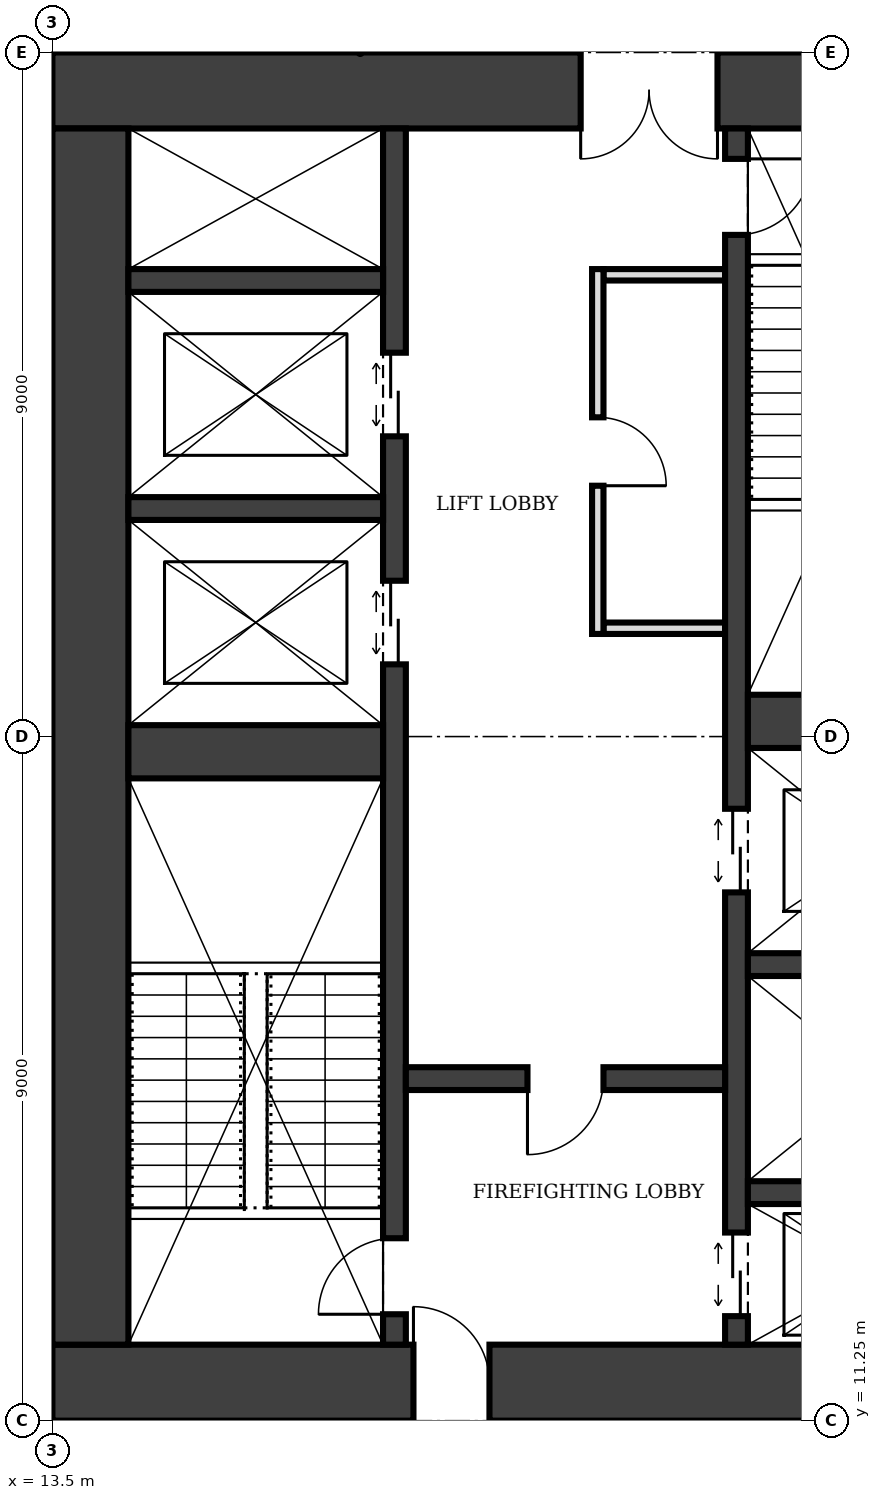
"""IFC4 building model, lengths in metres.
Left out: names, types, materials, properties, quantities, classifications, styles, units other than length and angle.
Written with IfcOpenShell. Run it as: python <this file> out.ifc"""

import sys

from ifc_helpers import new_model, si_unit, direction, frame, frame_2d, origin, place, context, subcontext, project, spatial, rectangle, extrude, element, fill, save


model = new_model("IFC4")
c1 = context("Model", 3, precision=1e-05, world=origin(), true_north=direction((0.0, 1.0)))
c2 = subcontext(c1, "Body", "Model", "MODEL_VIEW")
j1 = project(units=[si_unit("LENGTHUNIT", "METRE"), si_unit("PLANEANGLEUNIT", "RADIAN")], contexts=[c1])
p1 = place(None, origin())
s1 = spatial("IfcSite", under=j1, at=p1, CompositionType="ELEMENT")
p2 = place(p1, origin())
s2 = spatial("IfcBuilding", under=s1, at=p2, CompositionType="ELEMENT")
p3 = place(p2, frame((0.0, 0.0, 57.0)))
s3 = spatial("IfcBuildingStorey", under=s2, at=p3, CompositionType="ELEMENT", Elevation=57.0)
p4 = place(p3, frame((13.5, 11.75, 0.0), z_axis=(0.0, 0.0, 1.0), x_axis=(1.0, 0.0, 0.0)))
e1 = element("IfcWall", 1, at=p4, inside=s3, PredefinedType="SHEAR", context=c2, shape_type="SweptSolid", body=[
    extrude(rectangle(XDim=13.5, YDim=1.0, at=frame_2d((6.75, 0.0))), origin(), (0.0, 0.0, 1.0), 4.0),
])
p5 = place(p4, frame((4.75, 0.0, 0.0)))
e2 = element("IfcOpeningElement", 2, at=p5, cuts=e1, PredefinedType="OPENING", context=c2, shape_type="SweptSolid", body=[
    extrude(rectangle(XDim=1.0, YDim=2.1, at=frame_2d((0.5, 1.05))), frame((0.0, 0.51, 0.0), z_axis=(0.0, -1.0, 0.0), x_axis=(1.0, 0.0, 0.0)), (0.0, 0.0, 1.0), 1.02),
])
p6 = place(p3, frame((27.0, 28.75, 0.0), z_axis=(0.0, 0.0, 1.0), x_axis=(-1.0, 0.0, 0.0)))
e3 = element("IfcWall", 3, at=p6, inside=s3, PredefinedType="SHEAR", context=c2, shape_type="SweptSolid", body=[
    extrude(rectangle(XDim=13.5, YDim=1.0, at=frame_2d((6.75, 0.0))), origin(), (0.0, 0.0, 1.0), 4.0),
])
p7 = place(p6, frame((4.75, 0.0, 0.0)))
e4 = element("IfcOpeningElement", 4, at=p7, cuts=e3, PredefinedType="OPENING", context=c2, shape_type="SweptSolid", body=[
    extrude(rectangle(XDim=1.8, YDim=2.1, at=frame_2d((0.9, 1.05))), frame((0.0, 0.51, 0.0), z_axis=(0.0, -1.0, 0.0), x_axis=(1.0, 0.0, 0.0)), (0.0, 0.0, 1.0), 1.02),
])
p8 = place(p3, frame((14.0, 28.25, 0.0), z_axis=(0.0, 0.0, 1.0), x_axis=(0.0, -1.0, 0.0)))
e5 = element("IfcWall", 5, at=p8, inside=s3, PredefinedType="SHEAR", context=c2, shape_type="SweptSolid", body=[
    extrude(rectangle(XDim=16.0, YDim=1.0, at=frame_2d((8.0, 0.0))), origin(), (0.0, 0.0, 1.0), 4.0),
])
p9 = place(p3, frame((18.0, 12.25, 0.0), z_axis=(0.0, 0.0, 1.0), x_axis=(0.0, 1.0, 0.0)))
e6 = element("IfcWall", 6, at=p9, inside=s3, PredefinedType="SHEAR", context=c2, shape_type="SweptSolid", body=[
    extrude(rectangle(XDim=16.0, YDim=0.3, at=frame_2d((8.0, 0.0))), origin(), (0.0, 0.0, 1.0), 4.0),
])
p10 = place(p9, frame((0.4, 0.0, 0.0)))
e7 = element("IfcOpeningElement", 7, at=p10, cuts=e6, PredefinedType="OPENING", context=c2, shape_type="SweptSolid", body=[
    extrude(rectangle(XDim=1.0, YDim=2.1, at=frame_2d((0.5, 1.05))), frame((0.0, 0.16, 0.0), z_axis=(0.0, -1.0, 0.0), x_axis=(1.0, 0.0, 0.0)), (0.0, 0.0, 1.0), 0.32),
])
p11 = place(p9, frame((8.95, 0.0, 0.0)))
e8 = element("IfcOpeningElement", 8, at=p11, cuts=e6, PredefinedType="OPENING", context=c2, shape_type="SweptSolid", body=[
    extrude(rectangle(XDim=1.1, YDim=2.1, at=frame_2d((0.55, 1.05))), frame((0.0, 0.16, 0.0), z_axis=(0.0, -1.0, 0.0), x_axis=(1.0, 0.0, 0.0)), (0.0, 0.0, 1.0), 0.32),
])
p12 = place(p9, frame((11.95, 0.0, 0.0)))
e9 = element("IfcOpeningElement", 9, at=p12, cuts=e6, PredefinedType="OPENING", context=c2, shape_type="SweptSolid", body=[
    extrude(rectangle(XDim=1.1, YDim=2.1, at=frame_2d((0.55, 1.05))), frame((0.0, 0.16, 0.0), z_axis=(0.0, -1.0, 0.0), x_axis=(1.0, 0.0, 0.0)), (0.0, 0.0, 1.0), 0.32),
])
p13 = place(p3, frame((22.5, 12.25, 0.0), z_axis=(0.0, 0.0, 1.0), x_axis=(0.0, 1.0, 0.0)))
e10 = element("IfcWall", 10, at=p13, inside=s3, PredefinedType="SHEAR", context=c2, shape_type="SweptSolid", body=[
    extrude(rectangle(XDim=16.0, YDim=0.3, at=frame_2d((8.0, 0.0))), origin(), (0.0, 0.0, 1.0), 4.0),
])
p14 = place(p13, frame((14.6, 0.0, 0.0)))
e11 = element("IfcOpeningElement", 11, at=p14, cuts=e10, PredefinedType="OPENING", context=c2, shape_type="SweptSolid", body=[
    extrude(rectangle(XDim=1.0, YDim=2.1, at=frame_2d((0.5, 1.05))), frame((0.0, 0.16, 0.0), z_axis=(0.0, -1.0, 0.0), x_axis=(1.0, 0.0, 0.0)), (0.0, 0.0, 1.0), 0.32),
])
p15 = place(p13, frame((0.375, 0.0, 0.0)))
e12 = element("IfcOpeningElement", 12, at=p15, cuts=e10, PredefinedType="OPENING", context=c2, shape_type="SweptSolid", body=[
    extrude(rectangle(XDim=1.1, YDim=2.1, at=frame_2d((0.55, 1.05))), frame((0.0, 0.16, 0.0), z_axis=(0.0, -1.0, 0.0), x_axis=(1.0, 0.0, 0.0)), (0.0, 0.0, 1.0), 0.32),
])
p16 = place(p13, frame((5.95, 0.0, 0.0)))
e13 = element("IfcOpeningElement", 13, at=p16, cuts=e10, PredefinedType="OPENING", context=c2, shape_type="SweptSolid", body=[
    extrude(rectangle(XDim=1.1, YDim=2.1, at=frame_2d((0.55, 1.05))), frame((0.0, 0.16, 0.0), z_axis=(0.0, -1.0, 0.0), x_axis=(1.0, 0.0, 0.0)), (0.0, 0.0, 1.0), 0.32),
])
p17 = place(p3, frame((14.5, 20.05, 0.0), z_axis=(0.0, 0.0, 1.0), x_axis=(1.0, 0.0, 0.0)))
e14 = element("IfcWall", 14, at=p17, inside=s3, PredefinedType="SHEAR", context=c2, shape_type="SweptSolid", body=[
    extrude(rectangle(XDim=3.35, YDim=0.7, at=frame_2d((1.675, 0.0))), origin(), (0.0, 0.0, 1.0), 4.0),
])
p18 = place(p3, frame((18.15, 15.75, 0.0), z_axis=(0.0, 0.0, 1.0), x_axis=(1.0, 0.0, 0.0)))
e15 = element("IfcWall", 15, at=p18, inside=s3, PredefinedType="SHEAR", context=c2, shape_type="SweptSolid", body=[
    extrude(rectangle(XDim=4.2, YDim=0.3, at=frame_2d((2.1, 0.0))), origin(), (0.0, 0.0, 1.0), 4.0),
])
p19 = place(p18, frame((1.6, 0.0, 0.0)))
e16 = element("IfcOpeningElement", 16, at=p19, cuts=e15, PredefinedType="OPENING", context=c2, shape_type="SweptSolid", body=[
    extrude(rectangle(XDim=1.0, YDim=2.1, at=frame_2d((0.5, 1.05))), frame((0.0, 0.16, 0.0), z_axis=(0.0, -1.0, 0.0), x_axis=(1.0, 0.0, 0.0)), (0.0, 0.0, 1.0), 0.32),
])
for number, where, z_axis, x_axis in (
    (17, (22.65, 14.25, 0.0), (0.0, 0.0, 1.0), (1.0, 0.0, 0.0)),
    (18, (22.65, 17.25, 0.0), (0.0, 0.0, 1.0), (1.0, 0.0, 0.0)),
):
    element("IfcWall", number, at=place(p3, frame(where, z_axis=z_axis, x_axis=x_axis)), inside=s3, PredefinedType="SHEAR", context=c2, shape_type="SweptSolid", body=[
        extrude(rectangle(XDim=3.35, YDim=0.3, at=frame_2d((1.675, 0.0))), origin(), (0.0, 0.0, 1.0), 4.0),
    ])
p20 = place(p3, frame((22.65, 20.45, 0.0), z_axis=(0.0, 0.0, 1.0), x_axis=(1.0, 0.0, 0.0)))
e19 = element("IfcWall", 19, at=p20, inside=s3, PredefinedType="SHEAR", context=c2, shape_type="SweptSolid", body=[
    extrude(rectangle(XDim=3.35, YDim=0.7, at=frame_2d((1.675, 0.0))), origin(), (0.0, 0.0, 1.0), 4.0),
])
for number, where, z_axis, x_axis in (
    (20, (14.5, 23.25, 0.0), (0.0, 0.0, 1.0), (1.0, 0.0, 0.0)),
    (21, (14.5, 26.25, 0.0), (0.0, 0.0, 1.0), (1.0, 0.0, 0.0)),
):
    element("IfcWall", number, at=place(p3, frame(where, z_axis=z_axis, x_axis=x_axis)), inside=s3, PredefinedType="SHEAR", context=c2, shape_type="SweptSolid", body=[
        extrude(rectangle(XDim=3.35, YDim=0.3, at=frame_2d((1.675, 0.0))), origin(), (0.0, 0.0, 1.0), 4.0),
    ])
p21 = place(p3, frame((20.675, 21.6, 0.0), z_axis=(0.0, 0.0, 1.0), x_axis=(0.0, 1.0, 0.0)))
e22 = element("IfcWall", 22, at=p21, inside=s3, PredefinedType="PARTITIONING", context=c2, shape_type="SweptSolid", body=[
    extrude(rectangle(XDim=4.8, YDim=0.15, at=frame_2d((2.4, 0.0))), origin(), (0.0, 0.0, 1.0), 3.75),
])
p22 = place(p21, frame((1.95, 0.0, 0.0)))
e23 = element("IfcOpeningElement", 23, at=p22, cuts=e22, PredefinedType="OPENING", context=c2, shape_type="SweptSolid", body=[
    extrude(rectangle(XDim=0.9, YDim=2.1, at=frame_2d((0.45, 1.05))), frame((0.0, 0.085, 0.0), z_axis=(0.0, -1.0, 0.0), x_axis=(1.0, 0.0, 0.0)), (0.0, 0.0, 1.0), 0.17),
])
for number, where, z_axis, x_axis in (
    (24, (20.75, 21.675, 0.0), (0.0, 0.0, 1.0), (1.0, 0.0, 0.0)),
    (25, (20.75, 26.325, 0.0), (0.0, 0.0, 1.0), (1.0, 0.0, 0.0)),
):
    element("IfcWall", number, at=place(p3, frame(where, z_axis=z_axis, x_axis=x_axis)), inside=s3, PredefinedType="PARTITIONING", context=c2, shape_type="SweptSolid", body=[
        extrude(rectangle(XDim=1.6, YDim=0.15, at=frame_2d((0.8, 0.0))), origin(), (0.0, 0.0, 1.0), 3.75),
    ])
p23 = place(p5, origin())
e26 = element("IfcDoor", 26, at=p23, inside=s3, OperationType="SINGLE_SWING_LEFT", PredefinedType="DOOR", context=c2, shape_type="SweptSolid", body=[
    extrude(rectangle(XDim=1.0, YDim=2.1, at=frame_2d((0.5, 1.05))), frame((0.0, 0.025, 0.0), z_axis=(0.0, -1.0, 0.0), x_axis=(1.0, 0.0, 0.0)), (0.0, 0.0, 1.0), 0.05),
])
fill(e2, e26)
p24 = place(p7, origin())
e27 = element("IfcDoor", 27, at=p24, inside=s3, OperationType="DOUBLE_DOOR_SINGLE_SWING", PredefinedType="DOOR", context=c2, shape_type="SweptSolid", body=[
    extrude(rectangle(XDim=1.8, YDim=2.1, at=frame_2d((0.9, 1.05))), frame((0.0, 0.025, 0.0), z_axis=(0.0, -1.0, 0.0), x_axis=(1.0, 0.0, 0.0)), (0.0, 0.0, 1.0), 0.05),
])
fill(e4, e27)
p25 = place(p19, frame((1.0, 0.0, 0.0), z_axis=(0.0, 0.0, 1.0), x_axis=(-1.0, 0.0, 0.0)))
e28 = element("IfcDoor", 28, at=p25, inside=s3, OperationType="SINGLE_SWING_RIGHT", PredefinedType="DOOR", context=c2, shape_type="SweptSolid", body=[
    extrude(rectangle(XDim=1.0, YDim=2.1, at=frame_2d((0.5, 1.05))), frame((0.0, 0.025, 0.0), z_axis=(0.0, -1.0, 0.0), x_axis=(1.0, 0.0, 0.0)), (0.0, 0.0, 1.0), 0.05),
])
fill(e16, e28)
p26 = place(p10, origin())
e29 = element("IfcDoor", 29, at=p26, inside=s3, OperationType="SINGLE_SWING_LEFT", PredefinedType="DOOR", context=c2, shape_type="SweptSolid", body=[
    extrude(rectangle(XDim=1.0, YDim=2.1, at=frame_2d((0.5, 1.05))), frame((0.0, 0.025, 0.0), z_axis=(0.0, -1.0, 0.0), x_axis=(1.0, 0.0, 0.0)), (0.0, 0.0, 1.0), 0.05),
])
fill(e7, e29)
p27 = place(p14, frame((1.0, 0.0, 0.0), z_axis=(0.0, 0.0, 1.0), x_axis=(-1.0, 0.0, 0.0)))
e30 = element("IfcDoor", 30, at=p27, inside=s3, OperationType="SINGLE_SWING_LEFT", PredefinedType="DOOR", context=c2, shape_type="SweptSolid", body=[
    extrude(rectangle(XDim=1.0, YDim=2.1, at=frame_2d((0.5, 1.05))), frame((0.0, 0.025, 0.0), z_axis=(0.0, -1.0, 0.0), x_axis=(1.0, 0.0, 0.0)), (0.0, 0.0, 1.0), 0.05),
])
fill(e11, e30)
p28 = place(p15, origin())
e31 = element("IfcDoor", 31, at=p28, inside=s3, OperationType="DOUBLE_DOOR_SLIDING", PredefinedType="DOOR", context=c2, shape_type="SweptSolid", body=[
    extrude(rectangle(XDim=1.1, YDim=2.1, at=frame_2d((0.55, 1.05))), frame((0.0, 0.025, 0.0), z_axis=(0.0, -1.0, 0.0), x_axis=(1.0, 0.0, 0.0)), (0.0, 0.0, 1.0), 0.05),
])
fill(e12, e31)
p29 = place(p11, origin())
e32 = element("IfcDoor", 32, at=p29, inside=s3, OperationType="DOUBLE_DOOR_SLIDING", PredefinedType="DOOR", context=c2, shape_type="SweptSolid", body=[
    extrude(rectangle(XDim=1.1, YDim=2.1, at=frame_2d((0.55, 1.05))), frame((0.0, 0.025, 0.0), z_axis=(0.0, -1.0, 0.0), x_axis=(1.0, 0.0, 0.0)), (0.0, 0.0, 1.0), 0.05),
])
fill(e8, e32)
p30 = place(p12, origin())
e33 = element("IfcDoor", 33, at=p30, inside=s3, OperationType="DOUBLE_DOOR_SLIDING", PredefinedType="DOOR", context=c2, shape_type="SweptSolid", body=[
    extrude(rectangle(XDim=1.1, YDim=2.1, at=frame_2d((0.55, 1.05))), frame((0.0, 0.025, 0.0), z_axis=(0.0, -1.0, 0.0), x_axis=(1.0, 0.0, 0.0)), (0.0, 0.0, 1.0), 0.05),
])
fill(e9, e33)
p31 = place(p16, origin())
e34 = element("IfcDoor", 34, at=p31, inside=s3, OperationType="DOUBLE_DOOR_SLIDING", PredefinedType="DOOR", context=c2, shape_type="SweptSolid", body=[
    extrude(rectangle(XDim=1.1, YDim=2.1, at=frame_2d((0.55, 1.05))), frame((0.0, 0.025, 0.0), z_axis=(0.0, -1.0, 0.0), x_axis=(1.0, 0.0, 0.0)), (0.0, 0.0, 1.0), 0.05),
])
fill(e13, e34)
p32 = place(p22, frame((0.9, 0.0, 0.0), z_axis=(0.0, 0.0, 1.0), x_axis=(-1.0, 0.0, 0.0)))
e35 = element("IfcDoor", 35, at=p32, inside=s3, OperationType="SINGLE_SWING_RIGHT", PredefinedType="DOOR", context=c2, shape_type="SweptSolid", body=[
    extrude(rectangle(XDim=0.9, YDim=2.1, at=frame_2d((0.45, 1.05))), frame((0.0, 0.025, 0.0), z_axis=(0.0, -1.0, 0.0), x_axis=(1.0, 0.0, 0.0)), (0.0, 0.0, 1.0), 0.05),
])
fill(e23, e35)
save(model, sys.argv[1])
